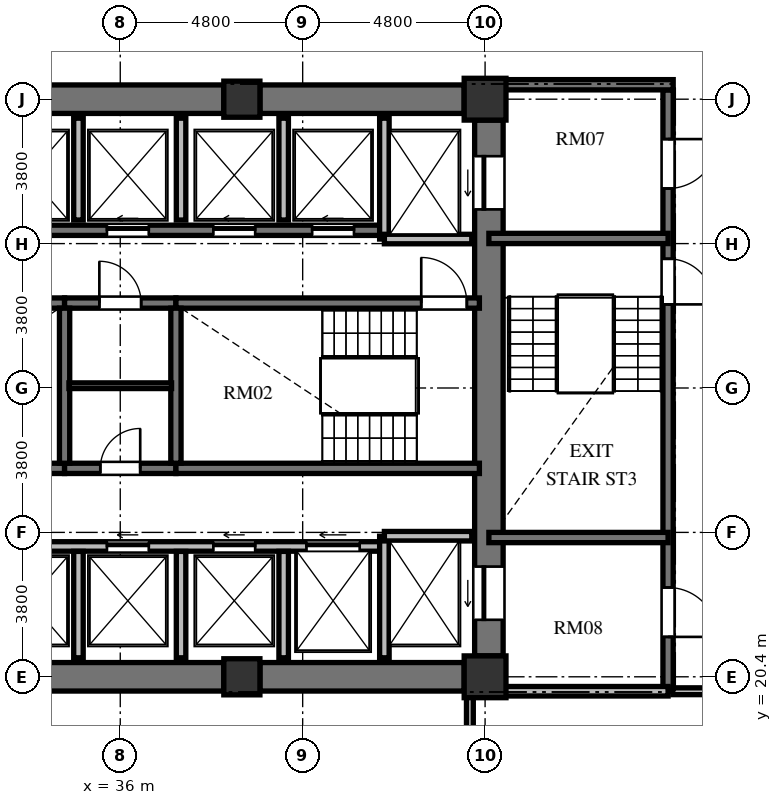
"""IFC4 building model, lengths in metres.
Left out: names, types, materials, properties, quantities, classifications, styles, units other than length and angle.
Written with IfcOpenShell. Run it as: python <this file> out.ifc"""

import sys

from ifc_helpers import new_model, si_unit, direction, frame, frame_2d, origin, origin_2d, place, context, subcontext, project, spatial, rectangle, extrude, element, fill, save


model = new_model("IFC4")
c1 = context("Model", 3, precision=1e-05, world=origin(), true_north=direction((0.0, 1.0)))
c2 = subcontext(c1, "Body", "Model", "MODEL_VIEW")
j1 = project(units=[si_unit("LENGTHUNIT", "METRE"), si_unit("PLANEANGLEUNIT", "RADIAN")], contexts=[c1])
p1 = place(None, origin())
s1 = spatial("IfcSite", under=j1, at=p1, CompositionType="ELEMENT")
p2 = place(p1, origin())
s2 = spatial("IfcBuilding", under=s1, at=p2, CompositionType="ELEMENT")
p3 = place(p2, frame((0.0, 0.0, 132.816)))
s3 = spatial("IfcBuildingStorey", under=s2, at=p3, CompositionType="ELEMENT", Elevation=132.816)
p4 = place(p3, frame((39.2, 20.4, 0.0), z_axis=(0.0, 0.0, 1.0), x_axis=(1.0, 0.0, 0.0)))
e1 = element("IfcColumn", 1, at=p4, inside=s3, PredefinedType="COLUMN", context=c2, shape_type="SweptSolid", body=[
    extrude(rectangle(XDim=0.95, YDim=0.95, at=origin_2d()), origin(), (0.0, 0.0, 1.0), 5.472),
])
for number, where, z_axis, x_axis in (
    (2, (45.6, 20.4, 0.0), (0.0, 0.0, 1.0), (1.0, 0.0, 0.0)),
    (3, (45.6, 35.6, 0.0), (0.0, 0.0, 1.0), (1.0, 0.0, 0.0)),
):
    element("IfcColumn", number, at=place(p3, frame(where, z_axis=z_axis, x_axis=x_axis)), inside=s3, PredefinedType="COLUMN", context=c2, shape_type="SweptSolid", body=[
        extrude(rectangle(XDim=1.1, YDim=1.1, at=origin_2d()), origin(), (0.0, 0.0, 1.0), 5.472),
    ])
p5 = place(p3, frame((39.2, 35.6, 0.0), z_axis=(0.0, 0.0, 1.0), x_axis=(1.0, 0.0, 0.0)))
e4 = element("IfcColumn", 4, at=p5, inside=s3, PredefinedType="COLUMN", context=c2, shape_type="SweptSolid", body=[
    extrude(rectangle(XDim=0.95, YDim=0.95, at=origin_2d()), origin(), (0.0, 0.0, 1.0), 5.472),
])
p6 = place(p3, frame((45.7, 20.95, 0.0), z_axis=(0.0, 0.0, 1.0), x_axis=(0.0, 1.0, 0.0)))
e5 = element("IfcWall", 5, at=p6, inside=s3, PredefinedType="SHEAR", context=c2, shape_type="SweptSolid", body=[
    extrude(rectangle(XDim=14.1, YDim=0.75, at=frame_2d((7.05, 0.0))), origin(), (0.0, 0.0, 1.0), 5.472),
])
p7 = place(p6, frame((11.75, 0.0, 0.0)))
e6 = element("IfcOpeningElement", 6, at=p7, cuts=e5, PredefinedType="OPENING", context=c2, shape_type="SweptSolid", body=[
    extrude(rectangle(XDim=1.4, YDim=2.3, at=frame_2d((0.7, 1.15))), frame((0.0, 0.385, 0.0), z_axis=(0.0, -1.0, 0.0), x_axis=(1.0, 0.0, 0.0)), (0.0, 0.0, 1.0), 0.77),
])
p8 = place(p6, frame((0.95, 0.0, 0.0)))
e7 = element("IfcOpeningElement", 7, at=p8, cuts=e5, PredefinedType="OPENING", context=c2, shape_type="SweptSolid", body=[
    extrude(rectangle(XDim=1.4, YDim=2.3, at=frame_2d((0.7, 1.15))), frame((0.0, 0.385, 0.0), z_axis=(0.0, -1.0, 0.0), x_axis=(1.0, 0.0, 0.0)), (0.0, 0.0, 1.0), 0.77),
])
for number, where, z_axis, x_axis in (
    (8, (33.275, 20.4, 0.0), (0.0, 0.0, 1.0), (1.0, 0.0, 0.0)),
    (9, (33.275, 35.6, 0.0), (0.0, 0.0, 1.0), (1.0, 0.0, 0.0)),
):
    element("IfcWall", number, at=place(p3, frame(where, z_axis=z_axis, x_axis=x_axis)), inside=s3, PredefinedType="SHEAR", context=c2, shape_type="SweptSolid", body=[
        extrude(rectangle(XDim=5.45, YDim=0.75, at=frame_2d((2.725, 0.0))), origin(), (0.0, 0.0, 1.0), 5.472),
    ])
for number, where, z_axis, x_axis in (
    (10, (39.675, 20.4, 0.0), (0.0, 0.0, 1.0), (1.0, 0.0, 0.0)),
    (11, (39.675, 35.6, 0.0), (0.0, 0.0, 1.0), (1.0, 0.0, 0.0)),
):
    element("IfcWall", number, at=place(p3, frame(where, z_axis=z_axis, x_axis=x_axis)), inside=s3, PredefinedType="SHEAR", context=c2, shape_type="SweptSolid", body=[
        extrude(rectangle(XDim=5.375, YDim=0.75, at=frame_2d((2.688, 0.0))), origin(), (0.0, 0.0, 1.0), 5.472),
    ])
p9 = place(p3, frame((26.55, 30.235, 0.0), z_axis=(0.0, 0.0, 1.0), x_axis=(1.0, 0.0, 0.0)))
e12 = element("IfcWall", 12, at=p9, inside=s3, PredefinedType="SHEAR", context=c2, shape_type="SweptSolid", body=[
    extrude(rectangle(XDim=7.985, YDim=0.27, at=frame_2d((3.992, 0.0))), origin(), (0.0, 0.0, 1.0), 5.472),
])
p10 = place(p3, frame((34.535, 30.235, 0.0), z_axis=(0.0, 0.0, 1.0), x_axis=(1.0, 0.0, 0.0)))
e13 = element("IfcWall", 13, at=p10, inside=s3, PredefinedType="SHEAR", context=c2, shape_type="SweptSolid", body=[
    extrude(rectangle(XDim=2.93, YDim=0.27, at=frame_2d((1.465, 0.0))), origin(), (0.0, 0.0, 1.0), 5.472),
])
p11 = place(p10, frame((0.915, 0.0, 0.0)))
e14 = element("IfcOpeningElement", 14, at=p11, cuts=e13, PredefinedType="OPENING", context=c2, shape_type="SweptSolid", body=[
    extrude(rectangle(XDim=1.1, YDim=2.15, at=frame_2d((0.55, 1.075))), frame((0.0, 0.145, 0.0), z_axis=(0.0, -1.0, 0.0), x_axis=(1.0, 0.0, 0.0)), (0.0, 0.0, 1.0), 0.29),
])
p12 = place(p3, frame((37.465, 30.235, 0.0), z_axis=(0.0, 0.0, 1.0), x_axis=(1.0, 0.0, 0.0)))
e15 = element("IfcWall", 15, at=p12, inside=s3, PredefinedType="SHEAR", context=c2, shape_type="SweptSolid", body=[
    extrude(rectangle(XDim=7.985, YDim=0.27, at=frame_2d((3.992, 0.0))), origin(), (0.0, 0.0, 1.0), 5.472),
])
p13 = place(p12, frame((6.455, 0.0, 0.0)))
e16 = element("IfcOpeningElement", 16, at=p13, cuts=e15, PredefinedType="OPENING", context=c2, shape_type="SweptSolid", body=[
    extrude(rectangle(XDim=1.2, YDim=2.15, at=frame_2d((0.6, 1.075))), frame((0.0, 0.145, 0.0), z_axis=(0.0, -1.0, 0.0), x_axis=(1.0, 0.0, 0.0)), (0.0, 0.0, 1.0), 0.29),
])
p14 = place(p3, frame((26.55, 25.885, 0.0), z_axis=(0.0, 0.0, 1.0), x_axis=(1.0, 0.0, 0.0)))
e17 = element("IfcWall", 17, at=p14, inside=s3, PredefinedType="SHEAR", context=c2, shape_type="SweptSolid", body=[
    extrude(rectangle(XDim=7.985, YDim=0.27, at=frame_2d((3.992, 0.0))), origin(), (0.0, 0.0, 1.0), 5.472),
])
p15 = place(p3, frame((34.535, 25.885, 0.0), z_axis=(0.0, 0.0, 1.0), x_axis=(1.0, 0.0, 0.0)))
e18 = element("IfcWall", 18, at=p15, inside=s3, PredefinedType="SHEAR", context=c2, shape_type="SweptSolid", body=[
    extrude(rectangle(XDim=2.93, YDim=0.27, at=frame_2d((1.465, 0.0))), origin(), (0.0, 0.0, 1.0), 5.472),
])
p16 = place(p15, frame((0.94, 0.0, 0.0)))
e19 = element("IfcOpeningElement", 19, at=p16, cuts=e18, PredefinedType="OPENING", context=c2, shape_type="SweptSolid", body=[
    extrude(rectangle(XDim=1.05, YDim=2.15, at=frame_2d((0.525, 1.075))), frame((0.0, 0.145, 0.0), z_axis=(0.0, -1.0, 0.0), x_axis=(1.0, 0.0, 0.0)), (0.0, 0.0, 1.0), 0.29),
])
p17 = place(p3, frame((37.465, 25.885, 0.0), z_axis=(0.0, 0.0, 1.0), x_axis=(1.0, 0.0, 0.0)))
e20 = element("IfcWall", 20, at=p17, inside=s3, PredefinedType="SHEAR", context=c2, shape_type="SweptSolid", body=[
    extrude(rectangle(XDim=7.985, YDim=0.27, at=frame_2d((3.992, 0.0))), origin(), (0.0, 0.0, 1.0), 5.472),
])
for number, where, z_axis, x_axis in (
    (21, (34.535, 26.02, 0.0), (0.0, 0.0, 1.0), (0.0, 1.0, 0.0)),
    (22, (37.465, 26.02, 0.0), (0.0, 0.0, 1.0), (0.0, 1.0, 0.0)),
):
    element("IfcWall", number, at=place(p3, frame(where, z_axis=z_axis, x_axis=x_axis)), inside=s3, PredefinedType="SHEAR", context=c2, shape_type="SweptSolid", body=[
        extrude(rectangle(XDim=4.08, YDim=0.27, at=frame_2d((2.04, 0.0))), origin(), (0.0, 0.0, 1.0), 5.472),
    ])
p18 = place(p3, frame((34.65, 28.06, 0.0), z_axis=(0.0, 0.0, 1.0), x_axis=(1.0, 0.0, 0.0)))
e23 = element("IfcWall", 23, at=p18, inside=s3, PredefinedType="PARTITIONING", context=c2, shape_type="SweptSolid", body=[
    extrude(rectangle(XDim=2.7, YDim=0.15, at=frame_2d((1.35, 0.0))), origin(), (0.0, 0.0, 1.0), 5.022),
])
p19 = place(p3, frame((26.55, 32.15, 0.0), z_axis=(0.0, 0.0, 1.0), x_axis=(1.0, 0.0, 0.0)))
e24 = element("IfcWall", 24, at=p19, inside=s3, PredefinedType="SHEAR", context=c2, shape_type="SweptSolid", body=[
    extrude(rectangle(XDim=16.4, YDim=0.27, at=frame_2d((8.2, 0.0))), origin(), (0.0, 0.0, 1.0), 5.472),
])
p20 = place(p19, frame((6.5, 0.0, 0.0)))
e25 = element("IfcOpeningElement", 25, at=p20, cuts=e24, PredefinedType="OPENING", context=c2, shape_type="SweptSolid", body=[
    extrude(rectangle(XDim=1.1, YDim=2.2, at=frame_2d((0.55, 1.1))), frame((0.0, 0.145, 0.0), z_axis=(0.0, -1.0, 0.0), x_axis=(1.0, 0.0, 0.0)), (0.0, 0.0, 1.0), 0.29),
])
p21 = place(p19, frame((9.1, 0.0, 0.0)))
e26 = element("IfcOpeningElement", 26, at=p21, cuts=e24, PredefinedType="OPENING", context=c2, shape_type="SweptSolid", body=[
    extrude(rectangle(XDim=1.1, YDim=2.2, at=frame_2d((0.55, 1.1))), frame((0.0, 0.145, 0.0), z_axis=(0.0, -1.0, 0.0), x_axis=(1.0, 0.0, 0.0)), (0.0, 0.0, 1.0), 0.29),
])
p22 = place(p19, frame((11.9, 0.0, 0.0)))
e27 = element("IfcOpeningElement", 27, at=p22, cuts=e24, PredefinedType="OPENING", context=c2, shape_type="SweptSolid", body=[
    extrude(rectangle(XDim=1.1, YDim=2.2, at=frame_2d((0.55, 1.1))), frame((0.0, 0.145, 0.0), z_axis=(0.0, -1.0, 0.0), x_axis=(1.0, 0.0, 0.0)), (0.0, 0.0, 1.0), 0.29),
])
p23 = place(p19, frame((14.5, 0.0, 0.0)))
e28 = element("IfcOpeningElement", 28, at=p23, cuts=e24, PredefinedType="OPENING", context=c2, shape_type="SweptSolid", body=[
    extrude(rectangle(XDim=1.1, YDim=2.2, at=frame_2d((0.55, 1.1))), frame((0.0, 0.145, 0.0), z_axis=(0.0, -1.0, 0.0), x_axis=(1.0, 0.0, 0.0)), (0.0, 0.0, 1.0), 0.29),
])
p24 = place(p3, frame((26.75, 23.83, 0.0), z_axis=(0.0, 0.0, 1.0), x_axis=(1.0, 0.0, 0.0)))
e29 = element("IfcWall", 29, at=p24, inside=s3, PredefinedType="SOLIDWALL", context=c2, shape_type="SweptSolid", body=[
    extrude(rectangle(XDim=16.2, YDim=0.25, at=frame_2d((8.1, 0.0))), origin(), (0.0, 0.0, 1.0), 5.022),
])
p25 = place(p24, frame((6.3, 0.0, 0.0)))
e30 = element("IfcOpeningElement", 30, at=p25, cuts=e29, PredefinedType="OPENING", context=c2, shape_type="SweptSolid", body=[
    extrude(rectangle(XDim=1.1, YDim=2.2, at=frame_2d((0.55, 1.1))), frame((0.0, 0.135, 0.0), z_axis=(0.0, -1.0, 0.0), x_axis=(1.0, 0.0, 0.0)), (0.0, 0.0, 1.0), 0.27),
])
p26 = place(p24, frame((8.9, 0.0, 0.0)))
e31 = element("IfcOpeningElement", 31, at=p26, cuts=e29, PredefinedType="OPENING", context=c2, shape_type="SweptSolid", body=[
    extrude(rectangle(XDim=1.1, YDim=2.2, at=frame_2d((0.55, 1.1))), frame((0.0, 0.135, 0.0), z_axis=(0.0, -1.0, 0.0), x_axis=(1.0, 0.0, 0.0)), (0.0, 0.0, 1.0), 0.27),
])
p27 = place(p24, frame((11.7, 0.0, 0.0)))
e32 = element("IfcOpeningElement", 32, at=p27, cuts=e29, PredefinedType="OPENING", context=c2, shape_type="SweptSolid", body=[
    extrude(rectangle(XDim=1.1, YDim=2.2, at=frame_2d((0.55, 1.1))), frame((0.0, 0.135, 0.0), z_axis=(0.0, -1.0, 0.0), x_axis=(1.0, 0.0, 0.0)), (0.0, 0.0, 1.0), 0.27),
])
p28 = place(p24, frame((14.15, 0.0, 0.0)))
e33 = element("IfcOpeningElement", 33, at=p28, cuts=e29, PredefinedType="OPENING", context=c2, shape_type="SweptSolid", body=[
    extrude(rectangle(XDim=1.4, YDim=2.3, at=frame_2d((0.7, 1.15))), frame((0.0, 0.135, 0.0), z_axis=(0.0, -1.0, 0.0), x_axis=(1.0, 0.0, 0.0)), (0.0, 0.0, 1.0), 0.27),
])
p29 = place(p3, frame((42.95, 31.92, 0.0), z_axis=(0.0, 0.0, 1.0), x_axis=(0.0, 1.0, 0.0)))
e34 = element("IfcWall", 34, at=p29, inside=s3, PredefinedType="SOLIDWALL", context=c2, shape_type="SweptSolid", body=[
    extrude(rectangle(XDim=3.18, YDim=0.25, at=frame_2d((1.59, 0.0))), origin(), (0.0, 0.0, 1.0), 5.022),
])
p30 = place(p3, frame((42.95, 31.92, 0.0), z_axis=(0.0, 0.0, 1.0), x_axis=(1.0, 0.0, 0.0)))
e35 = element("IfcWall", 35, at=p30, inside=s3, PredefinedType="SOLIDWALL", context=c2, shape_type="SweptSolid", body=[
    extrude(rectangle(XDim=2.3, YDim=0.25, at=frame_2d((1.15, 0.0))), origin(), (0.0, 0.0, 1.0), 5.022),
])
p31 = place(p3, frame((42.95, 20.9, 0.0), z_axis=(0.0, 0.0, 1.0), x_axis=(0.0, 1.0, 0.0)))
e36 = element("IfcWall", 36, at=p31, inside=s3, PredefinedType="SOLIDWALL", context=c2, shape_type="SweptSolid", body=[
    extrude(rectangle(XDim=3.2, YDim=0.25, at=frame_2d((1.6, 0.0))), origin(), (0.0, 0.0, 1.0), 5.022),
])
p32 = place(p3, frame((42.95, 24.1, 0.0), z_axis=(0.0, 0.0, 1.0), x_axis=(1.0, 0.0, 0.0)))
e37 = element("IfcWall", 37, at=p32, inside=s3, PredefinedType="SOLIDWALL", context=c2, shape_type="SweptSolid", body=[
    extrude(rectangle(XDim=2.3, YDim=0.25, at=frame_2d((1.15, 0.0))), origin(), (0.0, 0.0, 1.0), 5.022),
])
p33 = place(p3, frame((34.9, 32.42, 0.0), z_axis=(0.0, 0.0, 1.0), x_axis=(0.0, 1.0, 0.0)))
e38 = element("IfcWall", 38, at=p33, inside=s3, PredefinedType="SOLIDWALL", context=c2, shape_type="SweptSolid", body=[
    extrude(rectangle(XDim=2.68, YDim=0.25, at=frame_2d((1.34, 0.0))), origin(), (0.0, 0.0, 1.0), 5.022),
])
p34 = place(p3, frame((34.9, 20.9, 0.0), z_axis=(0.0, 0.0, 1.0), x_axis=(0.0, 1.0, 0.0)))
e39 = element("IfcWall", 39, at=p34, inside=s3, PredefinedType="SOLIDWALL", context=c2, shape_type="SweptSolid", body=[
    extrude(rectangle(XDim=2.8, YDim=0.25, at=frame_2d((1.4, 0.0))), origin(), (0.0, 0.0, 1.0), 5.022),
])
p35 = place(p3, frame((37.6, 32.42, 0.0), z_axis=(0.0, 0.0, 1.0), x_axis=(0.0, 1.0, 0.0)))
e40 = element("IfcWall", 40, at=p35, inside=s3, PredefinedType="SOLIDWALL", context=c2, shape_type="SweptSolid", body=[
    extrude(rectangle(XDim=2.68, YDim=0.25, at=frame_2d((1.34, 0.0))), origin(), (0.0, 0.0, 1.0), 5.022),
])
p36 = place(p3, frame((37.6, 20.9, 0.0), z_axis=(0.0, 0.0, 1.0), x_axis=(0.0, 1.0, 0.0)))
e41 = element("IfcWall", 41, at=p36, inside=s3, PredefinedType="SOLIDWALL", context=c2, shape_type="SweptSolid", body=[
    extrude(rectangle(XDim=2.8, YDim=0.25, at=frame_2d((1.4, 0.0))), origin(), (0.0, 0.0, 1.0), 5.022),
])
p37 = place(p3, frame((40.3, 32.42, 0.0), z_axis=(0.0, 0.0, 1.0), x_axis=(0.0, 1.0, 0.0)))
e42 = element("IfcWall", 42, at=p37, inside=s3, PredefinedType="SOLIDWALL", context=c2, shape_type="SweptSolid", body=[
    extrude(rectangle(XDim=2.68, YDim=0.25, at=frame_2d((1.34, 0.0))), origin(), (0.0, 0.0, 1.0), 5.022),
])
p38 = place(p3, frame((40.3, 20.9, 0.0), z_axis=(0.0, 0.0, 1.0), x_axis=(0.0, 1.0, 0.0)))
e43 = element("IfcWall", 43, at=p38, inside=s3, PredefinedType="SOLIDWALL", context=c2, shape_type="SweptSolid", body=[
    extrude(rectangle(XDim=2.8, YDim=0.25, at=frame_2d((1.4, 0.0))), origin(), (0.0, 0.0, 1.0), 5.022),
])
p39 = place(p3, frame((50.415, 35.845, 0.0), z_axis=(0.0, 0.0, 1.0), x_axis=(0.0, -1.0, 0.0)))
e44 = element("IfcWall", 44, at=p39, inside=s3, PredefinedType="SHEAR", context=c2, shape_type="SweptSolid", body=[
    extrude(rectangle(XDim=15.825, YDim=0.27, at=frame_2d((7.913, 0.0))), origin(), (0.0, 0.0, 1.0), 5.472),
])
p40 = place(p39, frame((4.445, 0.0, 0.0)))
e45 = element("IfcOpeningElement", 45, at=p40, cuts=e44, PredefinedType="OPENING", context=c2, shape_type="SweptSolid", body=[
    extrude(rectangle(XDim=1.2, YDim=2.15, at=frame_2d((0.6, 1.075))), frame((0.0, 0.145, 0.0), z_axis=(0.0, -1.0, 0.0), x_axis=(1.0, 0.0, 0.0)), (0.0, 0.0, 1.0), 0.29),
])
p41 = place(p39, frame((1.295, 0.0, 0.0)))
e46 = element("IfcOpeningElement", 46, at=p41, cuts=e44, PredefinedType="OPENING", context=c2, shape_type="SweptSolid", body=[
    extrude(rectangle(XDim=1.3, YDim=2.2, at=frame_2d((0.65, 1.1))), frame((0.0, 0.145, 0.0), z_axis=(0.0, -1.0, 0.0), x_axis=(1.0, 0.0, 0.0)), (0.0, 0.0, 1.0), 0.29),
])
p42 = place(p39, frame((13.095, 0.0, 0.0)))
e47 = element("IfcOpeningElement", 47, at=p42, cuts=e44, PredefinedType="OPENING", context=c2, shape_type="SweptSolid", body=[
    extrude(rectangle(XDim=1.3, YDim=2.2, at=frame_2d((0.65, 1.1))), frame((0.0, 0.145, 0.0), z_axis=(0.0, -1.0, 0.0), x_axis=(1.0, 0.0, 0.0)), (0.0, 0.0, 1.0), 0.29),
])
p43 = place(p3, frame((46.075, 35.98, 0.0), z_axis=(0.0, 0.0, 1.0), x_axis=(1.0, 0.0, 0.0)))
e48 = element("IfcWall", 48, at=p43, inside=s3, PredefinedType="SHEAR", context=c2, shape_type="SweptSolid", body=[
    extrude(rectangle(XDim=4.475, YDim=0.27, at=frame_2d((2.238, 0.0))), origin(), (0.0, 0.0, 1.0), 5.472),
])
for number, where, z_axis, x_axis in (
    (49, (45.7, 31.935, 0.0), (0.0, 0.0, 1.0), (1.0, 0.0, 0.0)),
    (50, (45.7, 24.065, 0.0), (0.0, 0.0, 1.0), (1.0, 0.0, 0.0)),
):
    element("IfcWall", number, at=place(p3, frame(where, z_axis=z_axis, x_axis=x_axis)), inside=s3, PredefinedType="SHEAR", context=c2, shape_type="SweptSolid", body=[
        extrude(rectangle(XDim=4.715, YDim=0.27, at=frame_2d((2.357, 0.0))), origin(), (0.0, 0.0, 1.0), 5.472),
    ])
p44 = place(p3, frame((45.7, 20.02, 0.0), z_axis=(0.0, 0.0, 1.0), x_axis=(1.0, 0.0, 0.0)))
e51 = element("IfcWall", 51, at=p44, inside=s3, PredefinedType="SOLIDWALL", context=c2, shape_type="SweptSolid", body=[
    extrude(rectangle(XDim=4.715, YDim=0.25, at=frame_2d((2.357, 0.0))), origin(), (0.0, 0.0, 1.0), 5.022),
])
p45 = place(p3, frame((53.19, 20.02, 0.0), z_axis=(0.0, 0.0, 1.0), x_axis=(-1.0, 0.0, 0.0)))
e52 = element("IfcWall", 52, at=p45, inside=s3, PredefinedType="PARTITIONING", context=c2, shape_type="SweptSolid", body=[
    extrude(rectangle(XDim=2.65, YDim=0.18, at=frame_2d((1.325, 0.0))), origin(), (0.0, 0.0, 1.0), 3.607),
])
p46 = place(p3, frame((45.2, 19.91, 0.0), z_axis=(0.0, 0.0, 1.0), x_axis=(0.0, -1.0, 0.0)))
e53 = element("IfcWall", 53, at=p46, inside=s3, PredefinedType="PARTITIONING", context=c2, shape_type="SweptSolid", body=[
    extrude(rectangle(XDim=2.55, YDim=0.18, at=frame_2d((1.275, 0.0))), origin(), (0.0, 0.0, 1.0), 5.022),
])
p47 = place(p13, origin())
e54 = element("IfcDoor", 54, at=p47, inside=s3, OperationType="SINGLE_SWING_LEFT", PredefinedType="DOOR", context=c2, shape_type="SweptSolid", body=[
    extrude(rectangle(XDim=1.2, YDim=2.15, at=frame_2d((0.6, 1.075))), frame((0.0, 0.025, 0.0), z_axis=(0.0, -1.0, 0.0), x_axis=(1.0, 0.0, 0.0)), (0.0, 0.0, 1.0), 0.05),
])
fill(e16, e54)
p48 = place(p16, origin())
e55 = element("IfcDoor", 55, at=p48, inside=s3, OperationType="SINGLE_SWING_RIGHT", PredefinedType="DOOR", context=c2, shape_type="SweptSolid", body=[
    extrude(rectangle(XDim=1.05, YDim=2.15, at=frame_2d((0.525, 1.075))), frame((0.0, 0.025, 0.0), z_axis=(0.0, -1.0, 0.0), x_axis=(1.0, 0.0, 0.0)), (0.0, 0.0, 1.0), 0.05),
])
fill(e19, e55)
p49 = place(p11, origin())
e56 = element("IfcDoor", 56, at=p49, inside=s3, OperationType="SINGLE_SWING_LEFT", PredefinedType="DOOR", context=c2, shape_type="SweptSolid", body=[
    extrude(rectangle(XDim=1.1, YDim=2.15, at=frame_2d((0.55, 1.075))), frame((0.0, 0.025, 0.0), z_axis=(0.0, -1.0, 0.0), x_axis=(1.0, 0.0, 0.0)), (0.0, 0.0, 1.0), 0.05),
])
fill(e14, e56)
p50 = place(p21, origin())
e57 = element("IfcDoor", 57, at=p50, inside=s3, OperationType="SLIDING_TO_LEFT", PredefinedType="DOOR", context=c2, shape_type="SweptSolid", body=[
    extrude(rectangle(XDim=1.1, YDim=2.2, at=frame_2d((0.55, 1.1))), frame((0.0, 0.025, 0.0), z_axis=(0.0, -1.0, 0.0), x_axis=(1.0, 0.0, 0.0)), (0.0, 0.0, 1.0), 0.05),
])
fill(e26, e57)
p51 = place(p26, origin())
e58 = element("IfcDoor", 58, at=p51, inside=s3, OperationType="SLIDING_TO_LEFT", PredefinedType="DOOR", context=c2, shape_type="SweptSolid", body=[
    extrude(rectangle(XDim=1.1, YDim=2.2, at=frame_2d((0.55, 1.1))), frame((0.0, 0.025, 0.0), z_axis=(0.0, -1.0, 0.0), x_axis=(1.0, 0.0, 0.0)), (0.0, 0.0, 1.0), 0.05),
])
fill(e31, e58)
p52 = place(p22, origin())
e59 = element("IfcDoor", 59, at=p52, inside=s3, OperationType="SLIDING_TO_LEFT", PredefinedType="DOOR", context=c2, shape_type="SweptSolid", body=[
    extrude(rectangle(XDim=1.1, YDim=2.2, at=frame_2d((0.55, 1.1))), frame((0.0, 0.025, 0.0), z_axis=(0.0, -1.0, 0.0), x_axis=(1.0, 0.0, 0.0)), (0.0, 0.0, 1.0), 0.05),
])
fill(e27, e59)
p53 = place(p23, origin())
e60 = element("IfcDoor", 60, at=p53, inside=s3, OperationType="SLIDING_TO_LEFT", PredefinedType="DOOR", context=c2, shape_type="SweptSolid", body=[
    extrude(rectangle(XDim=1.1, YDim=2.2, at=frame_2d((0.55, 1.1))), frame((0.0, 0.025, 0.0), z_axis=(0.0, -1.0, 0.0), x_axis=(1.0, 0.0, 0.0)), (0.0, 0.0, 1.0), 0.05),
])
fill(e28, e60)
p54 = place(p27, origin())
e61 = element("IfcDoor", 61, at=p54, inside=s3, OperationType="SLIDING_TO_LEFT", PredefinedType="DOOR", context=c2, shape_type="SweptSolid", body=[
    extrude(rectangle(XDim=1.1, YDim=2.2, at=frame_2d((0.55, 1.1))), frame((0.0, 0.025, 0.0), z_axis=(0.0, -1.0, 0.0), x_axis=(1.0, 0.0, 0.0)), (0.0, 0.0, 1.0), 0.05),
])
fill(e32, e61)
p55 = place(p7, origin())
e62 = element("IfcDoor", 62, at=p55, inside=s3, OperationType="SLIDING_TO_LEFT", PredefinedType="DOOR", context=c2, shape_type="SweptSolid", body=[
    extrude(rectangle(XDim=1.4, YDim=2.3, at=frame_2d((0.7, 1.15))), frame((0.0, 0.025, 0.0), z_axis=(0.0, -1.0, 0.0), x_axis=(1.0, 0.0, 0.0)), (0.0, 0.0, 1.0), 0.05),
])
fill(e6, e62)
p56 = place(p8, origin())
e63 = element("IfcDoor", 63, at=p56, inside=s3, OperationType="SLIDING_TO_LEFT", PredefinedType="DOOR", context=c2, shape_type="SweptSolid", body=[
    extrude(rectangle(XDim=1.4, YDim=2.3, at=frame_2d((0.7, 1.15))), frame((0.0, 0.025, 0.0), z_axis=(0.0, -1.0, 0.0), x_axis=(1.0, 0.0, 0.0)), (0.0, 0.0, 1.0), 0.05),
])
fill(e7, e63)
p57 = place(p28, origin())
e64 = element("IfcDoor", 64, at=p57, inside=s3, OperationType="SLIDING_TO_LEFT", PredefinedType="DOOR", context=c2, shape_type="SweptSolid", body=[
    extrude(rectangle(XDim=1.4, YDim=2.3, at=frame_2d((0.7, 1.15))), frame((0.0, 0.025, 0.0), z_axis=(0.0, -1.0, 0.0), x_axis=(1.0, 0.0, 0.0)), (0.0, 0.0, 1.0), 0.05),
])
fill(e33, e64)
p58 = place(p40, origin())
e65 = element("IfcDoor", 65, at=p58, inside=s3, OperationType="SINGLE_SWING_RIGHT", PredefinedType="DOOR", context=c2, shape_type="SweptSolid", body=[
    extrude(rectangle(XDim=1.2, YDim=2.15, at=frame_2d((0.6, 1.075))), frame((0.0, 0.025, 0.0), z_axis=(0.0, -1.0, 0.0), x_axis=(1.0, 0.0, 0.0)), (0.0, 0.0, 1.0), 0.05),
])
fill(e45, e65)
p59 = place(p41, origin())
e66 = element("IfcDoor", 66, at=p59, inside=s3, OperationType="SINGLE_SWING_LEFT", PredefinedType="DOOR", context=c2, shape_type="SweptSolid", body=[
    extrude(rectangle(XDim=1.3, YDim=2.2, at=frame_2d((0.65, 1.1))), frame((0.0, 0.025, 0.0), z_axis=(0.0, -1.0, 0.0), x_axis=(1.0, 0.0, 0.0)), (0.0, 0.0, 1.0), 0.05),
])
fill(e46, e66)
p60 = place(p42, origin())
e67 = element("IfcDoor", 67, at=p60, inside=s3, OperationType="SINGLE_SWING_RIGHT", PredefinedType="DOOR", context=c2, shape_type="SweptSolid", body=[
    extrude(rectangle(XDim=1.3, YDim=2.2, at=frame_2d((0.65, 1.1))), frame((0.0, 0.025, 0.0), z_axis=(0.0, -1.0, 0.0), x_axis=(1.0, 0.0, 0.0)), (0.0, 0.0, 1.0), 0.05),
])
fill(e47, e67)
save(model, sys.argv[1])
